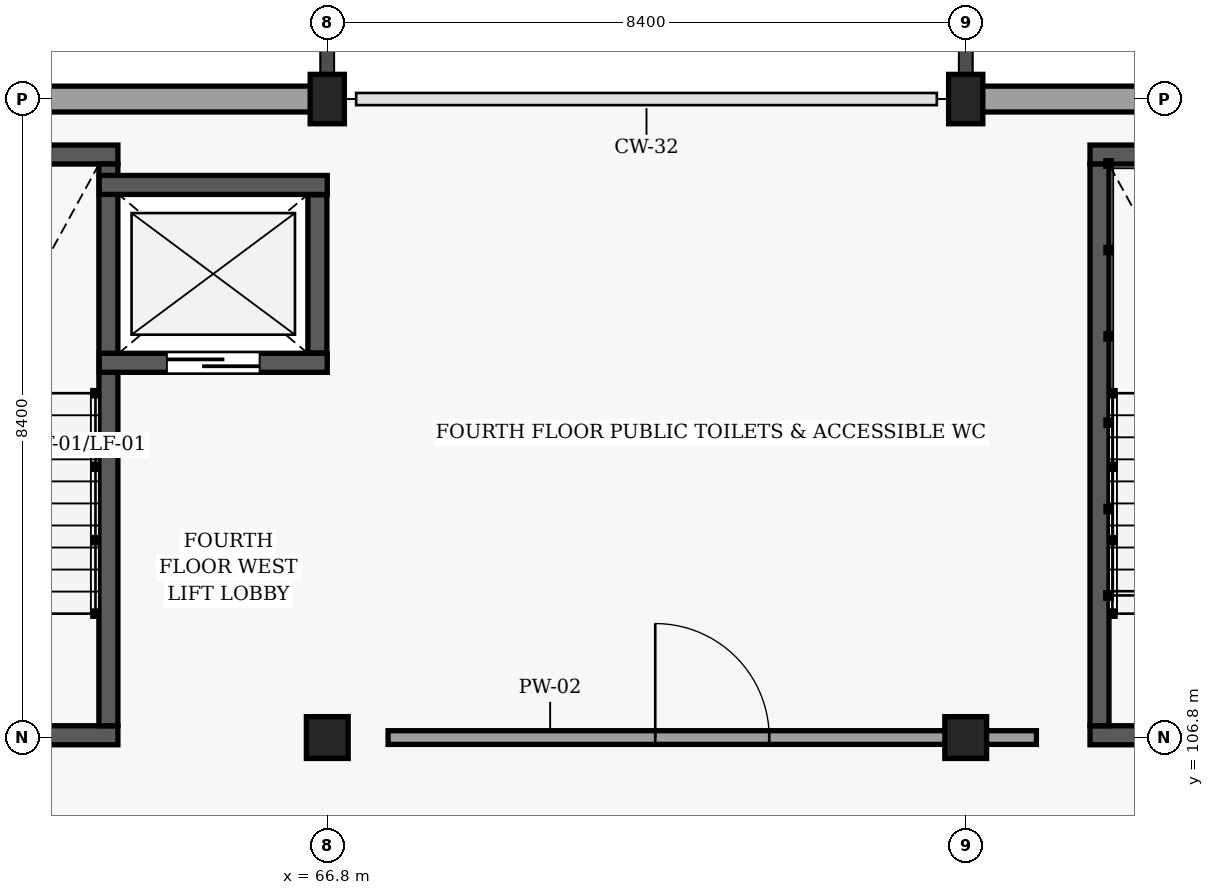
"""IFC4 building model, lengths in metres.
Left out: names, types, materials, properties, quantities, classifications, styles, units other than length and angle.
Written with IfcOpenShell. Run it as: python <this file> out.ifc"""

import sys

from ifc_helpers import new_model, si_unit, direction, frame, frame_2d, origin, origin_2d, place, context, subcontext, project, spatial, rectangle, extrude, element, fill, save


model = new_model("IFC4")
c1 = context("Model", 3, precision=1e-05, world=origin(), true_north=direction((0.0, 1.0)))
c2 = subcontext(c1, "Body", "Model", "MODEL_VIEW")
j1 = project(units=[si_unit("LENGTHUNIT", "METRE"), si_unit("PLANEANGLEUNIT", "RADIAN")], contexts=[c1])
p1 = place(None, origin())
s1 = spatial("IfcSite", under=j1, at=p1, CompositionType="ELEMENT")
p2 = place(p1, origin())
s2 = spatial("IfcBuilding", under=s1, at=p2, CompositionType="ELEMENT")
p3 = place(p2, frame((0.0, 0.0, 16.5)))
s3 = spatial("IfcBuildingStorey", under=s2, at=p3, CompositionType="ELEMENT", Elevation=16.5)
p4 = place(p3, frame((66.8, 106.8, 0.0), z_axis=(0.0, 0.0, 1.0), x_axis=(1.0, 0.0, 0.0)))
e1 = element("IfcColumn", 1, at=p4, inside=s3, PredefinedType="COLUMN", context=c2, shape_type="SweptSolid", body=[
    extrude(rectangle(XDim=0.55, YDim=0.55, at=origin_2d()), origin(), (0.0, 0.0, 1.0), 3.6),
])
p5 = place(p3, frame((66.8, 115.2, 0.0), z_axis=(0.0, 0.0, 1.0), x_axis=(1.0, 0.0, 0.0)))
e2 = element("IfcColumn", 2, at=p5, inside=s3, PredefinedType="COLUMN", context=c2, shape_type="SweptSolid", body=[
    extrude(rectangle(XDim=0.45, YDim=0.65, at=origin_2d()), origin(), (0.0, 0.0, 1.0), 3.6),
])
p6 = place(p3, frame((75.2, 106.8, 0.0), z_axis=(0.0, 0.0, 1.0), x_axis=(1.0, 0.0, 0.0)))
e3 = element("IfcColumn", 3, at=p6, inside=s3, PredefinedType="COLUMN", context=c2, shape_type="SweptSolid", body=[
    extrude(rectangle(XDim=0.55, YDim=0.55, at=origin_2d()), origin(), (0.0, 0.0, 1.0), 3.6),
])
p7 = place(p3, frame((75.2, 115.2, 0.0), z_axis=(0.0, 0.0, 1.0), x_axis=(1.0, 0.0, 0.0)))
e4 = element("IfcColumn", 4, at=p7, inside=s3, PredefinedType="COLUMN", context=c2, shape_type="SweptSolid", body=[
    extrude(rectangle(XDim=0.45, YDim=0.65, at=origin_2d()), origin(), (0.0, 0.0, 1.0), 3.6),
])
p8 = place(p3, frame((58.5, 115.2, 0.0), z_axis=(0.0, 0.0, 1.0), x_axis=(1.0, 0.0, 0.0)))
e5 = element("IfcWall", 5, at=p8, inside=s3, PredefinedType="SOLIDWALL", context=c2, shape_type="SweptSolid", body=[
    extrude(rectangle(XDim=8.2, YDim=0.34, at=frame_2d((4.1, 0.0))), origin(), (0.0, 0.0, 1.0), 2.885),
])
p9 = place(p3, frame((75.3, 115.2, 0.0), z_axis=(0.0, 0.0, 1.0), x_axis=(1.0, 0.0, 0.0)))
e6 = element("IfcWall", 6, at=p9, inside=s3, PredefinedType="SOLIDWALL", context=c2, shape_type="SweptSolid", body=[
    extrude(rectangle(XDim=8.6, YDim=0.34, at=frame_2d((4.3, 0.0))), origin(), (0.0, 0.0, 1.0), 2.885),
])
p10 = place(p3, frame((64.045, 106.83, 0.0), z_axis=(0.0, 0.0, 1.0), x_axis=(-1.0, 0.0, 0.0)))
e7 = element("IfcWall", 7, at=p10, inside=s3, PredefinedType="SHEAR", context=c2, shape_type="SweptSolid", body=[
    extrude(rectangle(XDim=3.61, YDim=0.25, at=frame_2d((1.805, 0.0))), origin(), (0.0, 0.0, 1.0), 3.38),
])
p11 = place(p10, frame((1.205, 0.0, 0.0)))
e8 = element("IfcOpeningElement", 8, at=p11, cuts=e7, PredefinedType="OPENING", context=c2, shape_type="SweptSolid", body=[
    extrude(rectangle(XDim=1.2, YDim=2.15, at=frame_2d((0.6, 1.075))), frame((0.0, 0.135, 0.0), z_axis=(0.0, -1.0, 0.0), x_axis=(1.0, 0.0, 0.0)), (0.0, 0.0, 1.0), 0.27),
])
p12 = place(p3, frame((60.435, 114.47, 0.0), z_axis=(0.0, 0.0, 1.0), x_axis=(1.0, 0.0, 0.0)))
e9 = element("IfcWall", 9, at=p12, inside=s3, PredefinedType="SHEAR", context=c2, shape_type="SweptSolid", body=[
    extrude(rectangle(XDim=3.61, YDim=0.25, at=frame_2d((1.805, 0.0))), origin(), (0.0, 0.0, 1.0), 3.38),
])
p13 = place(p3, frame((63.92, 114.345, 0.0), z_axis=(0.0, 0.0, 1.0), x_axis=(0.0, -1.0, 0.0)))
e10 = element("IfcWall", 10, at=p13, inside=s3, PredefinedType="SHEAR", context=c2, shape_type="SweptSolid", body=[
    extrude(rectangle(XDim=7.39, YDim=0.25, at=frame_2d((3.695, 0.0))), origin(), (0.0, 0.0, 1.0), 3.38),
])
p14 = place(p3, frame((63.8, 111.73, 0.0), z_axis=(0.0, 0.0, 1.0), x_axis=(1.0, 0.0, 0.0)))
e11 = element("IfcWall", 11, at=p14, inside=s3, PredefinedType="SHEAR", context=c2, shape_type="SweptSolid", body=[
    extrude(rectangle(XDim=3.0, YDim=0.25, at=frame_2d((1.5, 0.0))), origin(), (0.0, 0.0, 1.0), 3.38),
])
p15 = place(p14, frame((0.89, 0.0, 0.0)))
e12 = element("IfcOpeningElement", 12, at=p15, cuts=e11, PredefinedType="OPENING", context=c2, shape_type="SweptSolid", body=[
    extrude(rectangle(XDim=1.22, YDim=2.18, at=frame_2d((0.61, 1.09))), frame((0.0, 0.135, 0.0), z_axis=(0.0, -1.0, 0.0), x_axis=(1.0, 0.0, 0.0)), (0.0, 0.0, 1.0), 0.27),
])
p16 = place(p3, frame((66.8, 114.07, 0.0), z_axis=(0.0, 0.0, 1.0), x_axis=(-1.0, 0.0, 0.0)))
e13 = element("IfcWall", 13, at=p16, inside=s3, PredefinedType="SHEAR", context=c2, shape_type="SweptSolid", body=[
    extrude(rectangle(XDim=3.0, YDim=0.25, at=frame_2d((1.5, 0.0))), origin(), (0.0, 0.0, 1.0), 3.38),
])
p17 = place(p3, frame((66.67, 111.86, 0.0), z_axis=(0.0, 0.0, 1.0), x_axis=(0.0, 1.0, 0.0)))
e14 = element("IfcWall", 14, at=p17, inside=s3, PredefinedType="SHEAR", context=c2, shape_type="SweptSolid", body=[
    extrude(rectangle(XDim=2.08, YDim=0.25, at=frame_2d((1.04, 0.0))), origin(), (0.0, 0.0, 1.0), 3.38),
])
p18 = place(p3, frame((80.445, 106.83, 0.0), z_axis=(0.0, 0.0, 1.0), x_axis=(-1.0, 0.0, 0.0)))
e15 = element("IfcWall", 15, at=p18, inside=s3, PredefinedType="SHEAR", context=c2, shape_type="SweptSolid", body=[
    extrude(rectangle(XDim=3.61, YDim=0.25, at=frame_2d((1.805, 0.0))), origin(), (0.0, 0.0, 1.0), 3.38),
])
p19 = place(p18, frame((1.235, 0.0, 0.0)))
e16 = element("IfcOpeningElement", 16, at=p19, cuts=e15, PredefinedType="OPENING", context=c2, shape_type="SweptSolid", body=[
    extrude(rectangle(XDim=1.14, YDim=2.15, at=frame_2d((0.57, 1.075))), frame((0.0, 0.135, 0.0), z_axis=(0.0, -1.0, 0.0), x_axis=(1.0, 0.0, 0.0)), (0.0, 0.0, 1.0), 0.27),
])
p20 = place(p3, frame((76.835, 114.47, 0.0), z_axis=(0.0, 0.0, 1.0), x_axis=(1.0, 0.0, 0.0)))
e17 = element("IfcWall", 17, at=p20, inside=s3, PredefinedType="SHEAR", context=c2, shape_type="SweptSolid", body=[
    extrude(rectangle(XDim=3.61, YDim=0.25, at=frame_2d((1.805, 0.0))), origin(), (0.0, 0.0, 1.0), 3.38),
])
p21 = place(p3, frame((76.96, 106.955, 0.0), z_axis=(0.0, 0.0, 1.0), x_axis=(0.0, 1.0, 0.0)))
e18 = element("IfcWall", 18, at=p21, inside=s3, PredefinedType="SHEAR", context=c2, shape_type="SweptSolid", body=[
    extrude(rectangle(XDim=7.39, YDim=0.25, at=frame_2d((3.695, 0.0))), origin(), (0.0, 0.0, 1.0), 3.38),
])
p22 = place(p3, frame((67.6, 106.8, 0.0), z_axis=(0.0, 0.0, 1.0), x_axis=(1.0, 0.0, 0.0)))
e19 = element("IfcWall", 19, at=p22, inside=s3, PredefinedType="PARTITIONING", context=c2, shape_type="SweptSolid", body=[
    extrude(rectangle(XDim=8.53, YDim=0.18, at=frame_2d((4.265, 0.0))), origin(), (0.0, 0.0, 1.0), 2.665),
])
p23 = place(p22, frame((3.515, 0.0, 0.0)))
e20 = element("IfcOpeningElement", 20, at=p23, cuts=e19, PredefinedType="OPENING", context=c2, shape_type="SweptSolid", body=[
    extrude(rectangle(XDim=1.5, YDim=2.25, at=frame_2d((0.75, 1.125))), frame((0.0, 0.1, 0.0), z_axis=(0.0, -1.0, 0.0), x_axis=(1.0, 0.0, 0.0)), (0.0, 0.0, 1.0), 0.2),
])
p24 = place(p15, origin())
e21 = element("IfcDoor", 21, at=p24, inside=s3, OperationType="SLIDING_TO_RIGHT", PredefinedType="DOOR", context=c2, shape_type="SweptSolid", body=[
    extrude(rectangle(XDim=1.22, YDim=2.18, at=frame_2d((0.61, 1.09))), frame((0.0, 0.025, 0.0), z_axis=(0.0, -1.0, 0.0), x_axis=(1.0, 0.0, 0.0)), (0.0, 0.0, 1.0), 0.05),
])
fill(e12, e21)
p25 = place(p23, origin())
e22 = element("IfcDoor", 22, at=p25, inside=s3, OperationType="DOUBLE_DOOR_SINGLE_SWING", PredefinedType="DOOR", context=c2, shape_type="SweptSolid", body=[
    extrude(rectangle(XDim=1.5, YDim=2.25, at=frame_2d((0.75, 1.125))), frame((0.0, 0.025, 0.0), z_axis=(0.0, -1.0, 0.0), x_axis=(1.0, 0.0, 0.0)), (0.0, 0.0, 1.0), 0.05),
])
fill(e20, e22)
save(model, sys.argv[1])
